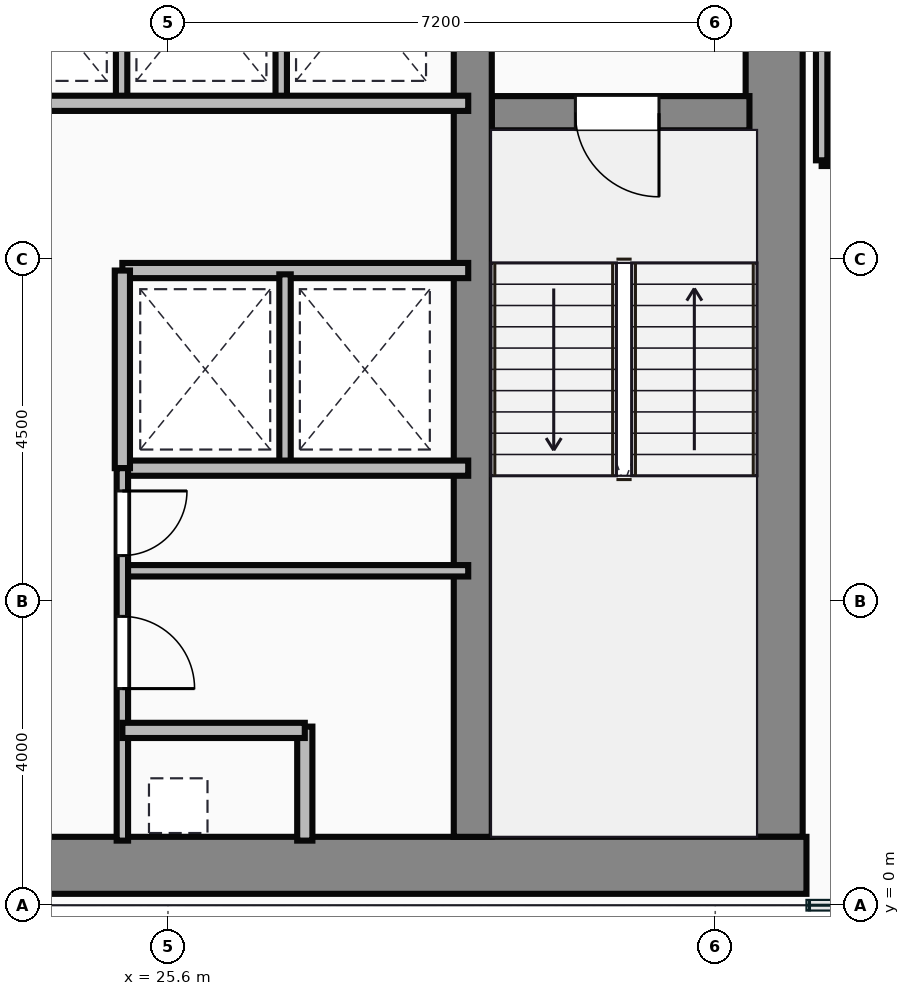
"""IFC4 building model, lengths in metres.
Left out: names, types, materials, properties, quantities, classifications, styles, units other than length and angle.
Written with IfcOpenShell. Run it as: python <this file> out.ifc"""

import sys

from ifc_helpers import new_model, si_unit, direction, frame, frame_2d, origin, place, context, subcontext, project, spatial, rectangle, extrude, source, transform, mapped, element, fill, save


model = new_model("IFC4")
c1 = context("Model", 3, precision=1e-05, world=origin(), true_north=direction((0.0, 1.0)))
c2 = subcontext(c1, "Body", "Model", "MODEL_VIEW")
j1 = project(units=[si_unit("LENGTHUNIT", "METRE"), si_unit("PLANEANGLEUNIT", "RADIAN")], contexts=[c1])
p1 = place(None, origin())
s1 = spatial("IfcSite", under=j1, at=p1, CompositionType="ELEMENT")
p2 = place(p1, origin())
s2 = spatial("IfcBuilding", under=s1, at=p2, CompositionType="ELEMENT")
p3 = place(p2, frame((0.0, 0.0, 155.2)))
s3 = spatial("IfcBuildingStorey", under=s2, at=p3, CompositionType="ELEMENT", Elevation=155.2)
m1 = source(origin(), c2, "Body", "SweptSolid", [
    extrude(rectangle(XDim=29.5, YDim=0.75, at=frame_2d((14.75, 0.0))), origin(), (0.0, 0.0, 1.0), 3.65),
])
p4 = place(p3, frame((4.5, 0.525, 0.0), z_axis=(0.0, 0.0, 1.0), x_axis=(1.0, 0.0, 0.0)))
e1 = element("IfcWall", 1, at=p4, inside=s3, PredefinedType="SHEAR", context=c2, shape_type="MappedRepresentation", body=[
    mapped(m1, transform((0.0, 0.0, 0.0))),
])
m2 = source(origin(), c2, "Body", "SweptSolid", [
    extrude(rectangle(XDim=13.1, YDim=0.75, at=frame_2d((6.55, 0.0))), origin(), (0.0, 0.0, 1.0), 3.65),
])
p5 = place(p3, frame((33.575, 0.9, 0.0), z_axis=(0.0, 0.0, 1.0), x_axis=(0.0, 1.0, 0.0)))
e2 = element("IfcWall", 2, at=p5, inside=s3, PredefinedType="SHEAR", context=c2, shape_type="MappedRepresentation", body=[
    mapped(m2, transform((0.0, 0.0, 0.0))),
])
m3 = source(origin(), c2, "Body", "SweptSolid", [
    extrude(rectangle(XDim=12.35, YDim=0.5, at=frame_2d((6.175, 0.0))), origin(), (0.0, 0.0, 1.0), 3.65),
])
p6 = place(p3, frame((29.61, 0.9, 0.0), z_axis=(0.0, 0.0, 1.0), x_axis=(0.0, 1.0, 0.0)))
e3 = element("IfcWall", 3, at=p6, inside=s3, PredefinedType="SHEAR", context=c2, shape_type="MappedRepresentation", body=[
    mapped(m3, transform((0.0, 0.0, 0.0))),
])
m4 = source(origin(), c2, "Body", "SweptSolid", [
    extrude(rectangle(XDim=3.39, YDim=0.45, at=frame_2d((1.695, 0.0))), origin(), (0.0, 0.0, 1.0), 3.65),
])
p7 = place(p3, frame((29.86, 10.42, 0.0), z_axis=(0.0, 0.0, 1.0), x_axis=(1.0, 0.0, 0.0)))
e4 = element("IfcWall", 4, at=p7, inside=s3, PredefinedType="SHEAR", context=c2, shape_type="MappedRepresentation", body=[
    mapped(m4, transform((0.0, 0.0, 0.0))),
])
p8 = place(p7, frame((1.1, 0.0, 0.0)))
e5 = element("IfcOpeningElement", 5, at=p8, cuts=e4, PredefinedType="OPENING", context=c2, shape_type="SweptSolid", body=[
    extrude(rectangle(XDim=1.1, YDim=2.15, at=frame_2d((0.55, 1.075))), frame((0.0, 0.235, 0.0), z_axis=(0.0, -1.0, 0.0), x_axis=(1.0, 0.0, 0.0)), (0.0, 0.0, 1.0), 0.47),
])
m5 = source(origin(), c2, "Body", "SweptSolid", [
    extrude(rectangle(XDim=8.8, YDim=0.2, at=frame_2d((4.4, 0.0))), origin(), (0.0, 0.0, 1.0), 3.4),
])
p9 = place(p3, frame((20.75, 10.55, 0.0), z_axis=(0.0, 0.0, 1.0), x_axis=(1.0, 0.0, 0.0)))
e6 = element("IfcWall", 6, at=p9, inside=s3, PredefinedType="PARTITIONING", context=c2, shape_type="MappedRepresentation", body=[
    mapped(m5, transform((0.0, 0.0, 0.0))),
])
m6 = source(origin(), c2, "Body", "SweptSolid", [
    extrude(rectangle(XDim=2.85, YDim=0.15, at=frame_2d((1.425, 0.0))), origin(), (0.0, 0.0, 1.0), 3.4),
])
for number, where, z_axis, x_axis in (
    (7, (24.99, 10.6, 0.0), (0.0, 0.0, 1.0), (0.0, 1.0, 0.0)),
    (8, (27.09, 10.6, 0.0), (0.0, 0.0, 1.0), (0.0, 1.0, 0.0)),
):
    element("IfcWall", number, at=place(p3, frame(where, z_axis=z_axis, x_axis=x_axis)), inside=s3, PredefinedType="PARTITIONING", context=c2, shape_type="MappedRepresentation", body=[
        mapped(m6, transform((0.0, 0.0, 0.0))),
    ])
m7 = source(origin(), c2, "Body", "SweptSolid", [
    extrude(rectangle(XDim=4.55, YDim=0.2, at=frame_2d((2.275, 0.0))), origin(), (0.0, 0.0, 1.0), 3.4),
])
for number, where, z_axis, x_axis in (
    (9, (25.0, 8.35, 0.0), (0.0, 0.0, 1.0), (1.0, 0.0, 0.0)),
    (10, (25.0, 5.75, 0.0), (0.0, 0.0, 1.0), (1.0, 0.0, 0.0)),
):
    element("IfcWall", number, at=place(p3, frame(where, z_axis=z_axis, x_axis=x_axis)), inside=s3, PredefinedType="PARTITIONING", context=c2, shape_type="MappedRepresentation", body=[
        mapped(m7, transform((0.0, 0.0, 0.0))),
    ])
m8 = source(origin(), c2, "Body", "SweptSolid", [
    extrude(rectangle(XDim=2.6, YDim=0.2, at=frame_2d((1.3, 0.0))), origin(), (0.0, 0.0, 1.0), 3.4),
])
p10 = place(p3, frame((25.0, 5.75, 0.0), z_axis=(0.0, 0.0, 1.0), x_axis=(0.0, 1.0, 0.0)))
e11 = element("IfcWall", 11, at=p10, inside=s3, PredefinedType="PARTITIONING", context=c2, shape_type="MappedRepresentation", body=[
    mapped(m8, transform((0.0, 0.0, 0.0))),
])
m9 = source(origin(), c2, "Body", "SweptSolid", [
    extrude(rectangle(XDim=2.5, YDim=0.15, at=frame_2d((1.25, 0.0))), origin(), (0.0, 0.0, 1.0), 3.4),
])
p11 = place(p3, frame((27.14, 5.8, 0.0), z_axis=(0.0, 0.0, 1.0), x_axis=(0.0, 1.0, 0.0)))
e12 = element("IfcWall", 12, at=p11, inside=s3, PredefinedType="PARTITIONING", context=c2, shape_type="MappedRepresentation", body=[
    mapped(m9, transform((0.0, 0.0, 0.0))),
])
m10 = source(origin(), c2, "Body", "SweptSolid", [
    extrude(rectangle(XDim=4.9, YDim=0.15, at=frame_2d((2.45, 0.0))), origin(), (0.0, 0.0, 1.0), 3.4),
])
p12 = place(p3, frame((25.0, 0.85, 0.0), z_axis=(0.0, 0.0, 1.0), x_axis=(0.0, 1.0, 0.0)))
e13 = element("IfcWall", 13, at=p12, inside=s3, PredefinedType="PARTITIONING", context=c2, shape_type="MappedRepresentation", body=[
    mapped(m10, transform((0.0, 0.0, 0.0))),
])
p13 = place(p12, frame((2.0, 0.0, 0.0)))
e14 = element("IfcOpeningElement", 14, at=p13, cuts=e13, PredefinedType="OPENING", context=c2, shape_type="SweptSolid", body=[
    extrude(rectangle(XDim=0.95, YDim=2.15, at=frame_2d((0.475, 1.075))), frame((0.0, 0.085, 0.0), z_axis=(0.0, -1.0, 0.0), x_axis=(1.0, 0.0, 0.0)), (0.0, 0.0, 1.0), 0.17),
])
p14 = place(p12, frame((3.75, 0.0, 0.0)))
e15 = element("IfcOpeningElement", 15, at=p14, cuts=e13, PredefinedType="OPENING", context=c2, shape_type="SweptSolid", body=[
    extrude(rectangle(XDim=0.85, YDim=2.15, at=frame_2d((0.425, 1.075))), frame((0.0, 0.085, 0.0), z_axis=(0.0, -1.0, 0.0), x_axis=(1.0, 0.0, 0.0)), (0.0, 0.0, 1.0), 0.17),
])
m11 = source(origin(), c2, "Body", "SweptSolid", [
    extrude(rectangle(XDim=2.4, YDim=0.2, at=frame_2d((1.2, 0.0))), origin(), (0.0, 0.0, 1.0), 3.4),
])
p15 = place(p3, frame((25.0, 2.3, 0.0), z_axis=(0.0, 0.0, 1.0), x_axis=(1.0, 0.0, 0.0)))
e16 = element("IfcWall", 16, at=p15, inside=s3, PredefinedType="PARTITIONING", context=c2, shape_type="MappedRepresentation", body=[
    mapped(m11, transform((0.0, 0.0, 0.0))),
])
m12 = source(origin(), c2, "Body", "SweptSolid", [
    extrude(rectangle(XDim=1.5, YDim=0.2, at=frame_2d((0.75, 0.0))), origin(), (0.0, 0.0, 1.0), 3.4),
])
p16 = place(p3, frame((27.4, 0.85, 0.0), z_axis=(0.0, 0.0, 1.0), x_axis=(0.0, 1.0, 0.0)))
e17 = element("IfcWall", 17, at=p16, inside=s3, PredefinedType="PARTITIONING", context=c2, shape_type="MappedRepresentation", body=[
    mapped(m12, transform((0.0, 0.0, 0.0))),
])
m13 = source(origin(), c2, "Body", "SweptSolid", [
    extrude(rectangle(XDim=4.55, YDim=0.15, at=frame_2d((2.275, 0.0))), origin(), (0.0, 0.0, 1.0), 3.4),
])
p17 = place(p3, frame((25.0, 4.4, 0.0), z_axis=(0.0, 0.0, 1.0), x_axis=(1.0, 0.0, 0.0)))
e18 = element("IfcWall", 18, at=p17, inside=s3, PredefinedType="PARTITIONING", context=c2, shape_type="MappedRepresentation", body=[
    mapped(m13, transform((0.0, 0.0, 0.0))),
])
m14 = source(origin(), c2, "Body", "SweptSolid", [
    extrude(rectangle(XDim=4.8, YDim=0.15, at=frame_2d((2.4, 0.0))), origin(), (0.0, 0.0, 1.0), 3.4),
])
p18 = place(p3, frame((34.2, 9.8, 0.0), z_axis=(0.0, 0.0, 1.0), x_axis=(1.0, 0.0, 0.0)))
e19 = element("IfcWall", 19, at=p18, inside=s3, PredefinedType="PARTITIONING", context=c2, shape_type="MappedRepresentation", body=[
    mapped(m14, transform((0.0, 0.0, 0.0))),
])
m15 = source(origin(), c2, "Body", "SweptSolid", [
    extrude(rectangle(XDim=4.18, YDim=0.15, at=frame_2d((2.09, 0.0))), origin(), (0.0, 0.0, 1.0), 3.4),
])
p19 = place(p3, frame((34.2, 9.8, 0.0), z_axis=(0.0, 0.0, 1.0), x_axis=(0.0, 1.0, 0.0)))
e20 = element("IfcWall", 20, at=p19, inside=s3, PredefinedType="PARTITIONING", context=c2, shape_type="MappedRepresentation", body=[
    mapped(m15, transform((0.0, 0.0, 0.0))),
])
m16 = source(origin(), c2, "Body", "SweptSolid", [
    extrude(rectangle(XDim=1.1, YDim=2.15, at=frame_2d((0.55, 1.075))), frame((0.0, 0.025, 0.0), z_axis=(0.0, -1.0, 0.0), x_axis=(1.0, 0.0, 0.0)), (0.0, 0.0, 1.0), 0.05),
])
p20 = place(p8, frame((1.1, 0.0, 0.0), z_axis=(0.0, 0.0, 1.0), x_axis=(-1.0, 0.0, 0.0)))
e21 = element("IfcDoor", 21, at=p20, inside=s3, OperationType="SINGLE_SWING_RIGHT", PredefinedType="DOOR", context=c2, shape_type="MappedRepresentation", body=[
    mapped(m16, transform((0.0, 0.0, 0.0))),
])
fill(e5, e21)
m17 = source(origin(), c2, "Body", "SweptSolid", [
    extrude(rectangle(XDim=0.95, YDim=2.15, at=frame_2d((0.475, 1.075))), frame((0.0, 0.025, 0.0), z_axis=(0.0, -1.0, 0.0), x_axis=(1.0, 0.0, 0.0)), (0.0, 0.0, 1.0), 0.05),
])
p21 = place(p13, origin())
e22 = element("IfcDoor", 22, at=p21, inside=s3, OperationType="SINGLE_SWING_LEFT", PredefinedType="DOOR", context=c2, shape_type="MappedRepresentation", body=[
    mapped(m17, transform((0.0, 0.0, 0.0))),
])
fill(e14, e22)
m18 = source(origin(), c2, "Body", "SweptSolid", [
    extrude(rectangle(XDim=0.85, YDim=2.15, at=frame_2d((0.425, 1.075))), frame((0.0, 0.025, 0.0), z_axis=(0.0, -1.0, 0.0), x_axis=(1.0, 0.0, 0.0)), (0.0, 0.0, 1.0), 0.05),
])
p22 = place(p14, origin())
e23 = element("IfcDoor", 23, at=p22, inside=s3, OperationType="SINGLE_SWING_RIGHT", PredefinedType="DOOR", context=c2, shape_type="MappedRepresentation", body=[
    mapped(m18, transform((0.0, 0.0, 0.0))),
])
fill(e15, e23)
save(model, sys.argv[1])
